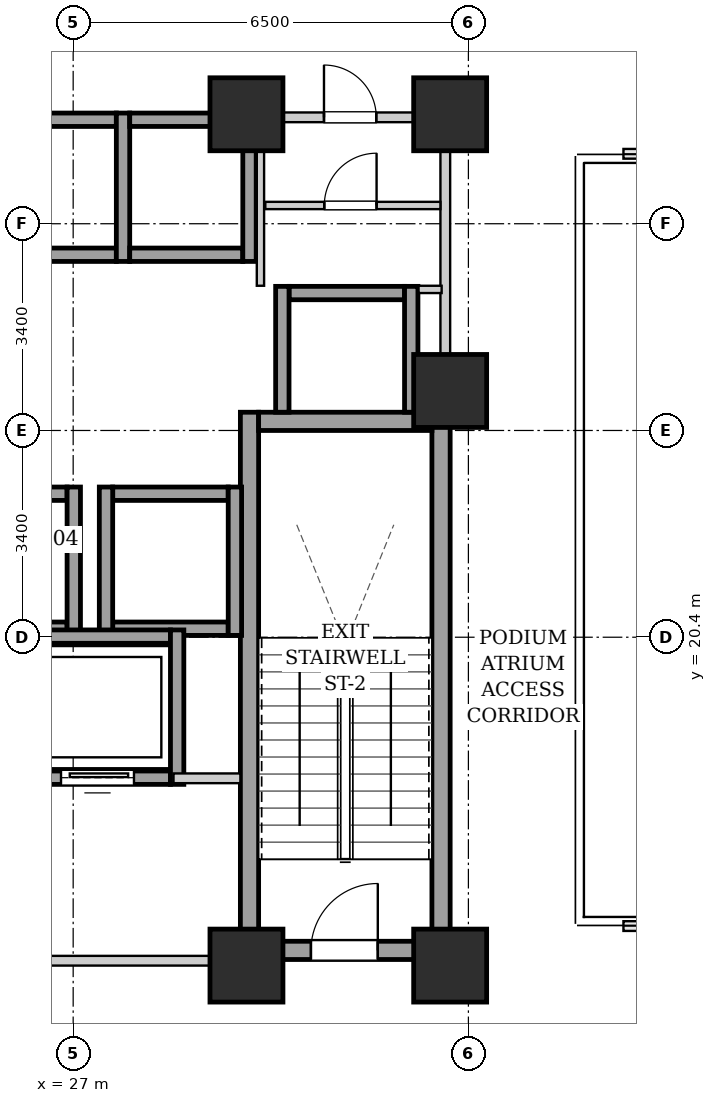
"""IFC4 building model, lengths in metres.
Left out: names, types, materials, properties, quantities, classifications, styles, units other than length and angle.
Written with IfcOpenShell. Run it as: python <this file> out.ifc"""

import sys

from ifc_helpers import new_model, si_unit, direction, frame, frame_2d, origin, origin_2d, place, context, subcontext, project, spatial, rectangle, extrude, element, fill, save


model = new_model("IFC4")
c1 = context("Model", 3, precision=1e-05, world=origin(), true_north=direction((0.0, 1.0)))
c2 = subcontext(c1, "Body", "Model", "MODEL_VIEW")
j1 = project(units=[si_unit("LENGTHUNIT", "METRE"), si_unit("PLANEANGLEUNIT", "RADIAN")], contexts=[c1])
p1 = place(None, origin())
s1 = spatial("IfcSite", under=j1, at=p1, CompositionType="ELEMENT")
p2 = place(p1, origin())
s2 = spatial("IfcBuilding", under=s1, at=p2, CompositionType="ELEMENT")
p3 = place(p2, frame((0.0, 0.0, 16.0)))
s3 = spatial("IfcBuildingStorey", under=s2, at=p3, CompositionType="ELEMENT", Elevation=16.0)
for number, where, z_axis, x_axis in (
    (1, (29.85, 15.0, 0.0), (0.0, 0.0, 1.0), (1.0, 0.0, 0.0)),
    (2, (33.2, 15.0, 0.0), (0.0, 0.0, 1.0), (1.0, 0.0, 0.0)),
    (3, (29.85, 29.0, 0.0), (0.0, 0.0, 1.0), (1.0, 0.0, 0.0)),
    (4, (33.2, 29.0, 0.0), (0.0, 0.0, 1.0), (1.0, 0.0, 0.0)),
    (5, (33.2, 24.45, 0.0), (0.0, 0.0, 1.0), (1.0, 0.0, 0.0)),
):
    element("IfcColumn", number, at=place(p3, frame(where, z_axis=z_axis, x_axis=x_axis)), inside=s3, PredefinedType="COLUMN", context=c2, shape_type="SweptSolid", body=[
        extrude(rectangle(XDim=1.2, YDim=1.2, at=origin_2d()), origin(), (0.0, 0.0, 1.0), 4.8),
    ])
for number, where, z_axis, x_axis in (
    (6, (29.9, 15.1, 0.0), (0.0, 0.0, 1.0), (0.0, 1.0, 0.0)),
    (7, (33.05, 15.1, 0.0), (0.0, 0.0, 1.0), (0.0, 1.0, 0.0)),
):
    element("IfcWall", number, at=place(p3, frame(where, z_axis=z_axis, x_axis=x_axis)), inside=s3, PredefinedType="SHEAR", context=c2, shape_type="SweptSolid", body=[
        extrude(rectangle(XDim=9.0, YDim=0.3, at=frame_2d((4.5, 0.0))), origin(), (0.0, 0.0, 1.0), 4.35),
    ])
p4 = place(p3, frame((30.05, 23.95, 0.0), z_axis=(0.0, 0.0, 1.0), x_axis=(1.0, 0.0, 0.0)))
e8 = element("IfcWall", 8, at=p4, inside=s3, PredefinedType="SHEAR", context=c2, shape_type="SweptSolid", body=[
    extrude(rectangle(XDim=2.85, YDim=0.3, at=frame_2d((1.425, 0.0))), origin(), (0.0, 0.0, 1.0), 4.35),
])
p5 = place(p3, frame((30.05, 15.25, 0.0), z_axis=(0.0, 0.0, 1.0), x_axis=(1.0, 0.0, 0.0)))
e9 = element("IfcWall", 9, at=p5, inside=s3, PredefinedType="SHEAR", context=c2, shape_type="SweptSolid", body=[
    extrude(rectangle(XDim=2.85, YDim=0.3, at=frame_2d((1.425, 0.0))), origin(), (0.0, 0.0, 1.0), 4.35),
])
p6 = place(p5, frame((0.86, 0.0, 0.0)))
e10 = element("IfcOpeningElement", 10, at=p6, cuts=e9, PredefinedType="OPENING", context=c2, shape_type="SweptSolid", body=[
    extrude(rectangle(XDim=1.1, YDim=2.05, at=frame_2d((0.55, 1.025))), frame((0.0, 0.16, 0.0), z_axis=(0.0, -1.0, 0.0), x_axis=(1.0, 0.0, 0.0)), (0.0, 0.0, 1.0), 0.32),
])
for number, where, z_axis, x_axis in (
    (11, (25.85, 26.69, 0.0), (0.0, 0.0, 1.0), (1.0, 0.0, 0.0)),
    (12, (25.85, 28.91, 0.0), (0.0, 0.0, 1.0), (1.0, 0.0, 0.0)),
):
    element("IfcWall", number, at=place(p3, frame(where, z_axis=z_axis, x_axis=x_axis)), inside=s3, PredefinedType="SHEAR", context=c2, shape_type="SweptSolid", body=[
        extrude(rectangle(XDim=1.86, YDim=0.22, at=frame_2d((0.93, 0.0))), origin(), (0.0, 0.0, 1.0), 4.35),
    ])
p7 = place(p3, frame((27.82, 26.58, 0.0), z_axis=(0.0, 0.0, 1.0), x_axis=(0.0, 1.0, 0.0)))
e13 = element("IfcWall", 13, at=p7, inside=s3, PredefinedType="SHEAR", context=c2, shape_type="SweptSolid", body=[
    extrude(rectangle(XDim=2.44, YDim=0.22, at=frame_2d((1.22, 0.0))), origin(), (0.0, 0.0, 1.0), 4.35),
])
for number, where, z_axis, x_axis in (
    (14, (27.93, 26.69, 0.0), (0.0, 0.0, 1.0), (1.0, 0.0, 0.0)),
    (15, (27.93, 28.91, 0.0), (0.0, 0.0, 1.0), (1.0, 0.0, 0.0)),
):
    element("IfcWall", number, at=place(p3, frame(where, z_axis=z_axis, x_axis=x_axis)), inside=s3, PredefinedType="SHEAR", context=c2, shape_type="SweptSolid", body=[
        extrude(rectangle(XDim=1.86, YDim=0.22, at=frame_2d((0.93, 0.0))), origin(), (0.0, 0.0, 1.0), 4.35),
    ])
p8 = place(p3, frame((29.9, 26.58, 0.0), z_axis=(0.0, 0.0, 1.0), x_axis=(0.0, 1.0, 0.0)))
e16 = element("IfcWall", 16, at=p8, inside=s3, PredefinedType="SHEAR", context=c2, shape_type="SweptSolid", body=[
    extrude(rectangle(XDim=2.44, YDim=0.22, at=frame_2d((1.22, 0.0))), origin(), (0.0, 0.0, 1.0), 4.35),
])
for number, where, z_axis, x_axis in (
    (17, (25.0, 20.54, 0.0), (0.0, 0.0, 1.0), (1.0, 0.0, 0.0)),
    (18, (25.0, 22.76, 0.0), (0.0, 0.0, 1.0), (1.0, 0.0, 0.0)),
):
    element("IfcWall", number, at=place(p3, frame(where, z_axis=z_axis, x_axis=x_axis)), inside=s3, PredefinedType="SHEAR", context=c2, shape_type="SweptSolid", body=[
        extrude(rectangle(XDim=1.9, YDim=0.22, at=frame_2d((0.95, 0.0))), origin(), (0.0, 0.0, 1.0), 4.35),
    ])
p9 = place(p3, frame((27.01, 20.43, 0.0), z_axis=(0.0, 0.0, 1.0), x_axis=(0.0, 1.0, 0.0)))
e19 = element("IfcWall", 19, at=p9, inside=s3, PredefinedType="SHEAR", context=c2, shape_type="SweptSolid", body=[
    extrude(rectangle(XDim=2.44, YDim=0.22, at=frame_2d((1.22, 0.0))), origin(), (0.0, 0.0, 1.0), 4.35),
])
for number, where, z_axis, x_axis in (
    (20, (27.65, 20.54, 0.0), (0.0, 0.0, 1.0), (1.0, 0.0, 0.0)),
    (21, (27.65, 22.76, 0.0), (0.0, 0.0, 1.0), (1.0, 0.0, 0.0)),
):
    element("IfcWall", number, at=place(p3, frame(where, z_axis=z_axis, x_axis=x_axis)), inside=s3, PredefinedType="SHEAR", context=c2, shape_type="SweptSolid", body=[
        extrude(rectangle(XDim=1.9, YDim=0.22, at=frame_2d((0.95, 0.0))), origin(), (0.0, 0.0, 1.0), 4.35),
    ])
for number, where, z_axis, x_axis in (
    (22, (27.54, 20.43, 0.0), (0.0, 0.0, 1.0), (0.0, 1.0, 0.0)),
    (23, (29.66, 20.43, 0.0), (0.0, 0.0, 1.0), (0.0, 1.0, 0.0)),
):
    element("IfcWall", number, at=place(p3, frame(where, z_axis=z_axis, x_axis=x_axis)), inside=s3, PredefinedType="SHEAR", context=c2, shape_type="SweptSolid", body=[
        extrude(rectangle(XDim=2.44, YDim=0.22, at=frame_2d((1.22, 0.0))), origin(), (0.0, 0.0, 1.0), 4.35),
    ])
p10 = place(p3, frame((30.55, 26.06, 0.0), z_axis=(0.0, 0.0, 1.0), x_axis=(1.0, 0.0, 0.0)))
e24 = element("IfcWall", 24, at=p10, inside=s3, PredefinedType="SHEAR", context=c2, shape_type="SweptSolid", body=[
    extrude(rectangle(XDim=1.9, YDim=0.22, at=frame_2d((0.95, 0.0))), origin(), (0.0, 0.0, 1.0), 4.35),
])
for number, where, z_axis, x_axis in (
    (25, (30.44, 24.1, 0.0), (0.0, 0.0, 1.0), (0.0, 1.0, 0.0)),
    (26, (32.56, 24.1, 0.0), (0.0, 0.0, 1.0), (0.0, 1.0, 0.0)),
):
    element("IfcWall", number, at=place(p3, frame(where, z_axis=z_axis, x_axis=x_axis)), inside=s3, PredefinedType="SHEAR", context=c2, shape_type="SweptSolid", body=[
        extrude(rectangle(XDim=2.07, YDim=0.22, at=frame_2d((1.035, 0.0))), origin(), (0.0, 0.0, 1.0), 4.35),
    ])
p11 = place(p3, frame((26.2, 18.09, 0.0), z_axis=(0.0, 0.0, 1.0), x_axis=(1.0, 0.0, 0.0)))
e27 = element("IfcWall", 27, at=p11, inside=s3, PredefinedType="SHEAR", context=c2, shape_type="SweptSolid", body=[
    extrude(rectangle(XDim=2.4, YDim=0.22, at=frame_2d((1.2, 0.0))), origin(), (0.0, 0.0, 1.0), 4.35),
])
p12 = place(p11, frame((0.6, 0.0, 0.0)))
e28 = element("IfcOpeningElement", 28, at=p12, cuts=e27, PredefinedType="OPENING", context=c2, shape_type="SweptSolid", body=[
    extrude(rectangle(XDim=1.2, YDim=2.15, at=frame_2d((0.6, 1.075))), frame((0.0, 0.12, 0.0), z_axis=(0.0, -1.0, 0.0), x_axis=(1.0, 0.0, 0.0)), (0.0, 0.0, 1.0), 0.24),
])
p13 = place(p3, frame((26.2, 20.41, 0.0), z_axis=(0.0, 0.0, 1.0), x_axis=(1.0, 0.0, 0.0)))
e29 = element("IfcWall", 29, at=p13, inside=s3, PredefinedType="SHEAR", context=c2, shape_type="SweptSolid", body=[
    extrude(rectangle(XDim=2.4, YDim=0.22, at=frame_2d((1.2, 0.0))), origin(), (0.0, 0.0, 1.0), 4.35),
])
p14 = place(p3, frame((28.71, 17.98, 0.0), z_axis=(0.0, 0.0, 1.0), x_axis=(0.0, 1.0, 0.0)))
e30 = element("IfcWall", 30, at=p14, inside=s3, PredefinedType="SHEAR", context=c2, shape_type="SweptSolid", body=[
    extrude(rectangle(XDim=2.54, YDim=0.22, at=frame_2d((1.27, 0.0))), origin(), (0.0, 0.0, 1.0), 4.35),
])
p15 = place(p3, frame((21.25, 15.08, 0.0), z_axis=(0.0, 0.0, 1.0), x_axis=(1.0, 0.0, 0.0)))
e31 = element("IfcWall", 31, at=p15, inside=s3, PredefinedType="PARTITIONING", context=c2, shape_type="SweptSolid", body=[
    extrude(rectangle(XDim=8.5, YDim=0.16, at=frame_2d((4.25, 0.0))), origin(), (0.0, 0.0, 1.0), 4.35),
])
p16 = place(p15, frame((3.725, 0.0, 0.0)))
e32 = element("IfcOpeningElement", 32, at=p16, cuts=e31, PredefinedType="OPENING", context=c2, shape_type="SweptSolid", body=[
    extrude(rectangle(XDim=1.05, YDim=2.05, at=frame_2d((0.525, 1.025))), frame((0.0, 0.09, 0.0), z_axis=(0.0, -1.0, 0.0), x_axis=(1.0, 0.0, 0.0)), (0.0, 0.0, 1.0), 0.18),
])
p17 = place(p3, frame((28.65, 18.08, 0.0), z_axis=(0.0, 0.0, 1.0), x_axis=(1.0, 0.0, 0.0)))
e33 = element("IfcWall", 33, at=p17, inside=s3, PredefinedType="PARTITIONING", context=c2, shape_type="SweptSolid", body=[
    extrude(rectangle(XDim=1.1, YDim=0.16, at=frame_2d((0.55, 0.0))), origin(), (0.0, 0.0, 1.0), 4.35),
])
p18 = place(p3, frame((33.12, 24.12, 0.0), z_axis=(0.0, 0.0, 1.0), x_axis=(0.0, 1.0, 0.0)))
e34 = element("IfcWall", 34, at=p18, inside=s3, PredefinedType="PARTITIONING", context=c2, shape_type="SweptSolid", body=[
    extrude(rectangle(XDim=4.76, YDim=0.16, at=frame_2d((2.38, 0.0))), origin(), (0.0, 0.0, 1.0), 4.35),
])
p19 = place(p3, frame((30.08, 26.18, 0.0), z_axis=(0.0, 0.0, 1.0), x_axis=(0.0, 1.0, 0.0)))
e35 = element("IfcWall", 35, at=p19, inside=s3, PredefinedType="PARTITIONING", context=c2, shape_type="SweptSolid", body=[
    extrude(rectangle(XDim=2.68, YDim=0.12, at=frame_2d((1.34, 0.0))), origin(), (0.0, 0.0, 1.0), 4.35),
])
p20 = place(p3, frame((32.68, 26.12, 0.0), z_axis=(0.0, 0.0, 1.0), x_axis=(1.0, 0.0, 0.0)))
e36 = element("IfcWall", 36, at=p20, inside=s3, PredefinedType="PARTITIONING", context=c2, shape_type="SweptSolid", body=[
    extrude(rectangle(XDim=0.38, YDim=0.12, at=frame_2d((0.19, 0.0))), origin(), (0.0, 0.0, 1.0), 4.35),
])
p21 = place(p3, frame((30.16, 27.5, 0.0), z_axis=(0.0, 0.0, 1.0), x_axis=(1.0, 0.0, 0.0)))
e37 = element("IfcWall", 37, at=p21, inside=s3, PredefinedType="PARTITIONING", context=c2, shape_type="SweptSolid", body=[
    extrude(rectangle(XDim=2.88, YDim=0.12, at=frame_2d((1.44, 0.0))), origin(), (0.0, 0.0, 1.0), 4.35),
])
p22 = place(p21, frame((0.97, 0.0, 0.0)))
e38 = element("IfcOpeningElement", 38, at=p22, cuts=e37, PredefinedType="OPENING", context=c2, shape_type="SweptSolid", body=[
    extrude(rectangle(XDim=0.86, YDim=2.05, at=frame_2d((0.43, 1.025))), frame((0.0, 0.07, 0.0), z_axis=(0.0, -1.0, 0.0), x_axis=(1.0, 0.0, 0.0)), (0.0, 0.0, 1.0), 0.14),
])
p23 = place(p3, frame((30.08, 28.95, 0.0), z_axis=(0.0, 0.0, 1.0), x_axis=(1.0, 0.0, 0.0)))
e39 = element("IfcWall", 39, at=p23, inside=s3, PredefinedType="PARTITIONING", context=c2, shape_type="SweptSolid", body=[
    extrude(rectangle(XDim=2.96, YDim=0.16, at=frame_2d((1.48, 0.0))), origin(), (0.0, 0.0, 1.0), 4.35),
])
p24 = place(p23, frame((1.045, 0.0, 0.0)))
e40 = element("IfcOpeningElement", 40, at=p24, cuts=e39, PredefinedType="OPENING", context=c2, shape_type="SweptSolid", body=[
    extrude(rectangle(XDim=0.86, YDim=2.05, at=frame_2d((0.43, 1.025))), frame((0.0, 0.09, 0.0), z_axis=(0.0, -1.0, 0.0), x_axis=(1.0, 0.0, 0.0)), (0.0, 0.0, 1.0), 0.18),
])
p25 = place(p6, origin())
e41 = element("IfcDoor", 41, at=p25, inside=s3, OperationType="SINGLE_SWING_RIGHT", PredefinedType="DOOR", context=c2, shape_type="SweptSolid", body=[
    extrude(rectangle(XDim=1.1, YDim=2.05, at=frame_2d((0.55, 1.025))), frame((0.0, 0.025, 0.0), z_axis=(0.0, -1.0, 0.0), x_axis=(1.0, 0.0, 0.0)), (0.0, 0.0, 1.0), 0.05),
])
fill(e10, e41)
p26 = place(p12, origin())
e42 = element("IfcDoor", 42, at=p26, inside=s3, OperationType="SLIDING_TO_LEFT", PredefinedType="DOOR", context=c2, shape_type="SweptSolid", body=[
    extrude(rectangle(XDim=1.2, YDim=2.15, at=frame_2d((0.6, 1.075))), frame((0.0, 0.025, 0.0), z_axis=(0.0, -1.0, 0.0), x_axis=(1.0, 0.0, 0.0)), (0.0, 0.0, 1.0), 0.05),
])
fill(e28, e42)
p27 = place(p22, origin())
e43 = element("IfcDoor", 43, at=p27, inside=s3, OperationType="SINGLE_SWING_RIGHT", PredefinedType="DOOR", context=c2, shape_type="SweptSolid", body=[
    extrude(rectangle(XDim=0.86, YDim=2.05, at=frame_2d((0.43, 1.025))), frame((0.0, 0.025, 0.0), z_axis=(0.0, -1.0, 0.0), x_axis=(1.0, 0.0, 0.0)), (0.0, 0.0, 1.0), 0.05),
])
fill(e38, e43)
p28 = place(p24, origin())
e44 = element("IfcDoor", 44, at=p28, inside=s3, OperationType="SINGLE_SWING_LEFT", PredefinedType="DOOR", context=c2, shape_type="SweptSolid", body=[
    extrude(rectangle(XDim=0.86, YDim=2.05, at=frame_2d((0.43, 1.025))), frame((0.0, 0.025, 0.0), z_axis=(0.0, -1.0, 0.0), x_axis=(1.0, 0.0, 0.0)), (0.0, 0.0, 1.0), 0.05),
])
fill(e40, e44)
save(model, sys.argv[1])
